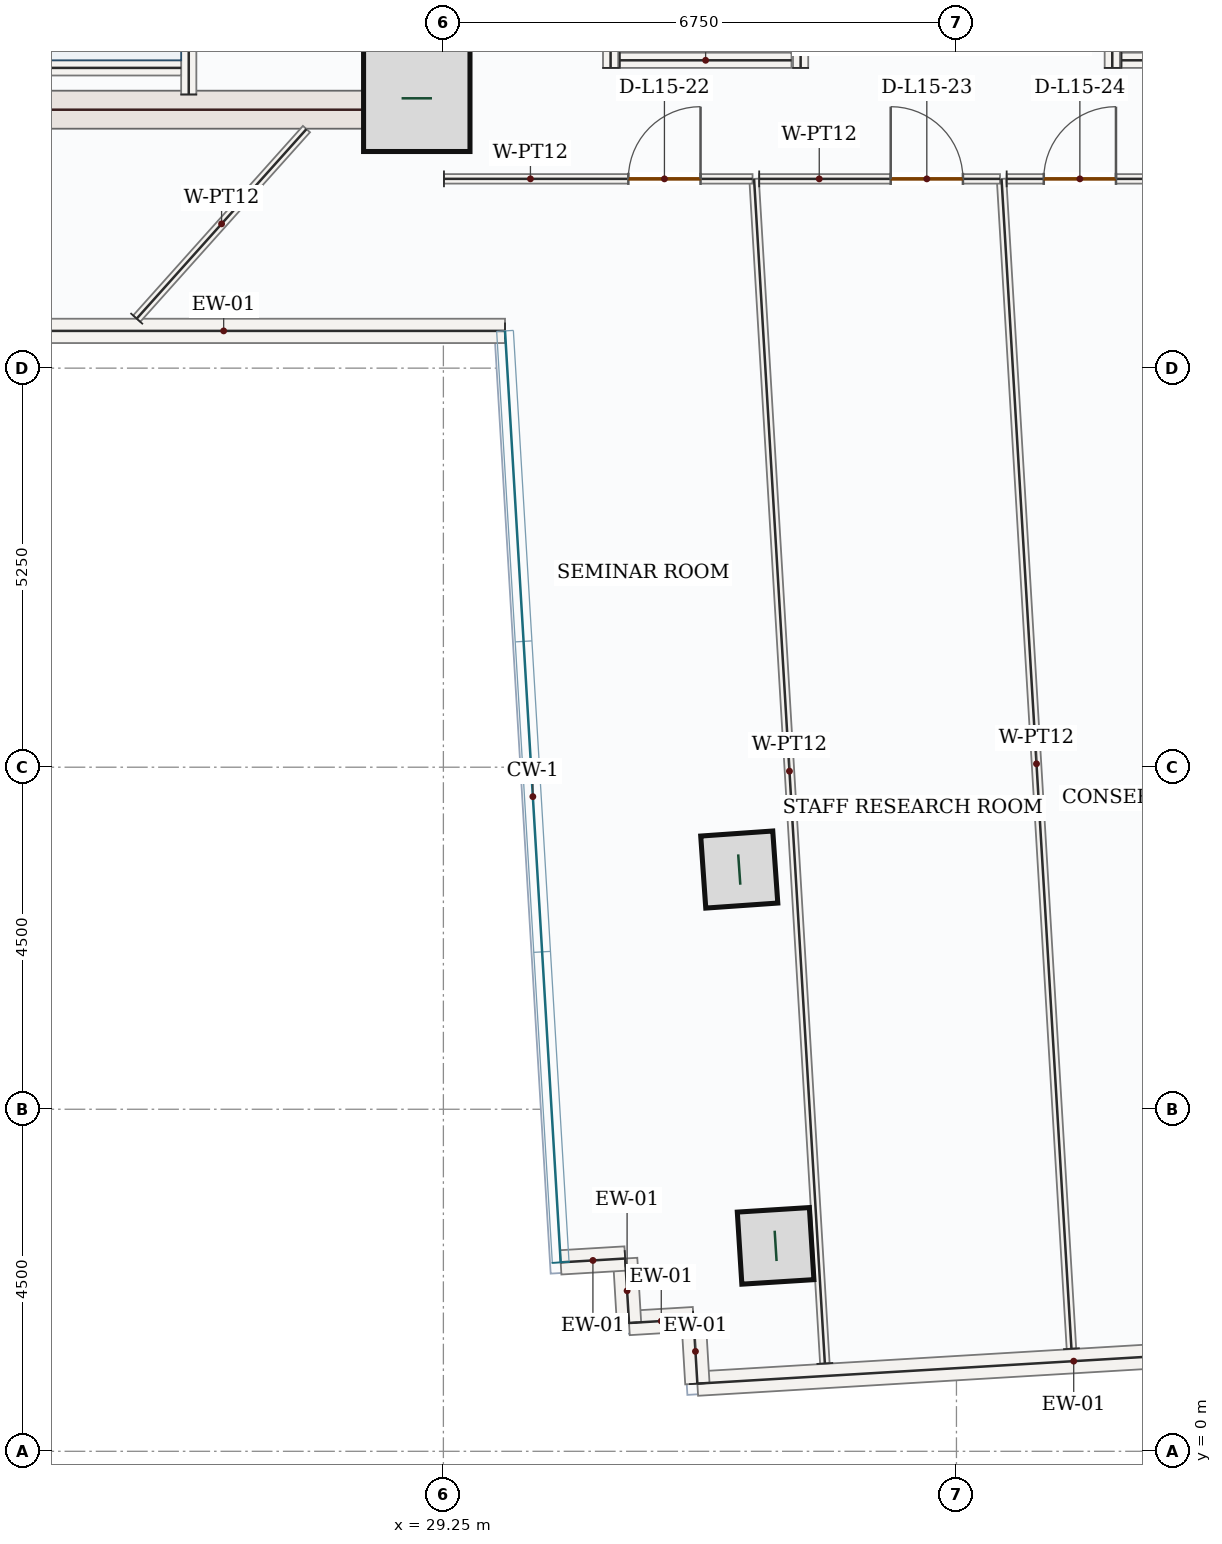
"""IFC4 building model, lengths in metres.
Left out: names, types, materials, properties, quantities, classifications, styles, units other than length and angle.
Written with IfcOpenShell. Run it as: python <this file> out.ifc"""

import sys

from ifc_helpers import new_model, si_unit, direction, frame, frame_2d, origin, origin_2d, place, context, subcontext, project, spatial, rectangle, hollow_rectangle, extrude, source, transform, mapped, element, fill, save


model = new_model("IFC4")
c1 = context("Model", 3, precision=1e-05, world=origin(), true_north=direction((0.0, 1.0)))
c2 = subcontext(c1, "Body", "Model", "MODEL_VIEW")
j1 = project(units=[si_unit("LENGTHUNIT", "METRE"), si_unit("PLANEANGLEUNIT", "RADIAN")], contexts=[c1])
p1 = place(None, origin())
s1 = spatial("IfcSite", under=j1, at=p1, CompositionType="ELEMENT")
p2 = place(p1, origin())
s2 = spatial("IfcBuilding", under=s1, at=p2, CompositionType="ELEMENT")
p3 = place(p2, frame((0.0, 0.0, 71.1)))
s3 = spatial("IfcBuildingStorey", under=s2, at=p3, CompositionType="ELEMENT", Elevation=71.1)
p4 = place(p3, frame((29.0, 17.4, 0.0), z_axis=(0.0, 0.0, 1.0), x_axis=(0.0, 1.0, 0.0)))
e1 = element("IfcWall", 1, at=p4, inside=s3, PredefinedType="SHEAR", context=c2, shape_type="SweptSolid", body=[
    extrude(rectangle(XDim=8.55, YDim=0.5, at=frame_2d((4.275, 0.0))), origin(), (0.0, 0.0, 1.0), 3.95),
])
p5 = place(p4, frame((6.65, 0.0, 0.0)))
e2 = element("IfcOpeningElement", 2, at=p5, cuts=e1, PredefinedType="OPENING", context=c2, shape_type="SweptSolid", body=[
    extrude(rectangle(XDim=1.1, YDim=2.2, at=frame_2d((0.55, 1.1))), frame((0.0, 0.26, 0.0), z_axis=(0.0, -1.0, 0.0), x_axis=(1.0, 0.0, 0.0)), (0.0, 0.0, 1.0), 0.52),
])
p6 = place(p4, frame((3.15, 0.0, 0.0)))
e3 = element("IfcOpeningElement", 3, at=p6, cuts=e1, PredefinedType="OPENING", context=c2, shape_type="SweptSolid", body=[
    extrude(rectangle(XDim=0.88, YDim=2.1, at=frame_2d((0.44, 1.05))), frame((0.0, 0.26, 0.0), z_axis=(0.0, -1.0, 0.0), x_axis=(1.0, 0.0, 0.0)), (0.0, 0.0, 1.0), 0.52),
])
m1 = source(origin(), c2, "Body", "SweptSolid", [
    extrude(rectangle(XDim=7.0, YDim=0.5, at=frame_2d((3.5, 0.0))), origin(), (0.0, 0.0, 1.0), 3.95),
])
p7 = place(p3, frame((21.75, 17.65, 0.0), z_axis=(0.0, 0.0, 1.0), x_axis=(1.0, 0.0, 0.0)))
e4 = element("IfcWall", 4, at=p7, inside=s3, PredefinedType="SHEAR", context=c2, shape_type="MappedRepresentation", body=[
    mapped(m1, transform((0.0, 0.0, 0.0), x_axis=(1.0, 0.0, 0.0), y_axis=(0.0, 1.0, 0.0), z_axis=(0.0, 0.0, 1.0), scale=1.0)),
])
m2 = source(origin(), c2, "Body", "SweptSolid", [
    extrude(rectangle(XDim=1.4, YDim=1.4, at=origin_2d()), origin(), (0.0, 0.0, 1.0), 4.2),
])
p8 = place(p3, frame((28.9, 17.8, 0.0), z_axis=(0.0, 0.0, 1.0), x_axis=(1.0, 0.0, 0.0)))
e5 = element("IfcColumn", 5, at=p8, inside=s3, PredefinedType="COLUMN", context=c2, shape_type="MappedRepresentation", body=[
    mapped(m2, transform((0.0, 0.0, 0.0), x_axis=(1.0, 0.0, 0.0), y_axis=(0.0, 1.0, 0.0), z_axis=(0.0, 0.0, 1.0), scale=1.0)),
])
m3 = source(origin(), c2, "Body", "SweptSolid", [
    extrude(hollow_rectangle(XDim=0.95, YDim=0.95, WallThickness=0.05, at=origin_2d()), origin(), (0.0, 0.0, 1.0), 4.2),
])
for number, where, z_axis, x_axis in (
    (6, (33.143, 7.654, 0.0), (0.0, 0.0, 1.0), (-0.07, 0.998, 0.0)),
    (7, (33.621, 2.703, 0.0), (0.0, 0.0, 1.0), (-0.063, 0.998, 0.0)),
):
    element("IfcColumn", number, at=place(p3, frame(where, z_axis=z_axis, x_axis=x_axis)), inside=s3, PredefinedType="COLUMN", context=c2, shape_type="MappedRepresentation", body=[
        mapped(m3, transform((0.0, 0.0, 0.0), x_axis=(1.0, 0.0, 0.0), y_axis=(0.0, 1.0, 0.0), z_axis=(0.0, 0.0, 1.0), scale=1.0)),
    ])
m4 = source(origin(), c2, "Body", "SweptSolid", [
    extrude(rectangle(XDim=9.92, YDim=0.32, at=frame_2d((4.96, 0.0))), origin(), (0.0, 0.0, 1.0), 3.95),
])
p9 = place(p3, frame((42.494, 1.482, 0.0), z_axis=(0.0, 0.0, 1.0), x_axis=(-0.998218942745, -0.059656871726, 0.0)))
e8 = element("IfcWall", 8, at=p9, inside=s3, PredefinedType="SOLIDWALL", context=c2, shape_type="MappedRepresentation", body=[
    mapped(m4, transform((0.0, 0.0, 0.0), x_axis=(1.0, 0.0, 0.0), y_axis=(0.0, 1.0, 0.0), z_axis=(0.0, 0.0, 1.0), scale=1.0)),
])
m5 = source(origin(), c2, "Body", "SweptSolid", [
    extrude(rectangle(XDim=0.85, YDim=0.32, at=frame_2d((0.425, 0.0))), origin(), (0.0, 0.0, 1.0), 3.95),
])
p10 = place(p3, frame((32.592, 0.89, 0.0), z_axis=(0.0, 0.0, 1.0), x_axis=(-0.059732049764, 0.998214447016, 0.0)))
e9 = element("IfcWall", 9, at=p10, inside=s3, PredefinedType="SOLIDWALL", context=c2, shape_type="MappedRepresentation", body=[
    mapped(m5, transform((0.0, 0.0, 0.0), x_axis=(1.0, 0.0, 0.0), y_axis=(0.0, 1.0, 0.0), z_axis=(0.0, 0.0, 1.0), scale=1.0)),
])
m6 = source(origin(), c2, "Body", "SweptSolid", [
    extrude(rectangle(XDim=0.85, YDim=0.32, at=frame_2d((0.425, 0.0))), origin(), (0.0, 0.0, 1.0), 3.95),
])
for number, where, z_axis, x_axis in (
    (10, (32.541, 1.739, 0.0), (0.0, 0.0, 1.0), (-0.998, -0.06, 0.0)),
    (11, (31.692, 1.688, 0.0), (0.0, 0.0, 1.0), (-0.06, 0.998, 0.0)),
    (12, (31.642, 2.536, 0.0), (0.0, 0.0, 1.0), (-0.998, -0.06, 0.0)),
):
    element("IfcWall", number, at=place(p3, frame(where, z_axis=z_axis, x_axis=x_axis)), inside=s3, PredefinedType="SOLIDWALL", context=c2, shape_type="MappedRepresentation", body=[
        mapped(m6, transform((0.0, 0.0, 0.0), x_axis=(1.0, 0.0, 0.0), y_axis=(0.0, 1.0, 0.0), z_axis=(0.0, 0.0, 1.0), scale=1.0)),
    ])
m7 = source(origin(), c2, "Body", "SweptSolid", [
    extrude(rectangle(XDim=7.403, YDim=0.32, at=frame_2d((3.701, 0.0))), origin(), (0.0, 0.0, 1.0), 3.95),
])
p11 = place(p3, frame((30.061, 14.74, 0.0), z_axis=(0.0, 0.0, 1.0), x_axis=(-1.0, 0.0, 0.0)))
e13 = element("IfcWall", 13, at=p11, inside=s3, PredefinedType="SOLIDWALL", context=c2, shape_type="MappedRepresentation", body=[
    mapped(m7, transform((0.0, 0.0, 0.0), x_axis=(1.0, 0.0, 0.0), y_axis=(0.0, 1.0, 0.0), z_axis=(0.0, 0.0, 1.0), scale=1.0)),
])
p12 = place(p3, frame((25.9, 17.85, 0.0), z_axis=(0.0, 0.0, 1.0), x_axis=(0.0, 1.0, 0.0)))
e14 = element("IfcWall", 14, at=p12, inside=s3, PredefinedType="SOLIDWALL", context=c2, shape_type="SweptSolid", body=[
    extrude(rectangle(XDim=8.0, YDim=0.2, at=frame_2d((4.0, 0.0))), origin(), (0.0, 0.0, 1.0), 3.95),
])
p13 = place(p12, frame((6.3, 0.0, 0.0)))
e15 = element("IfcOpeningElement", 15, at=p13, cuts=e14, PredefinedType="OPENING", context=c2, shape_type="SweptSolid", body=[
    extrude(rectangle(XDim=1.05, YDim=2.15, at=frame_2d((0.525, 1.075))), frame((0.0, 0.11, 0.0), z_axis=(0.0, -1.0, 0.0), x_axis=(1.0, 0.0, 0.0)), (0.0, 0.0, 1.0), 0.22),
])
m8 = source(origin(), c2, "Body", "SweptSolid", [
    extrude(rectangle(XDim=3.25, YDim=0.2, at=frame_2d((1.625, 0.0))), origin(), (0.0, 0.0, 1.0), 3.95),
])
p14 = place(p3, frame((22.55, 18.2, 0.0), z_axis=(0.0, 0.0, 1.0), x_axis=(1.0, 0.0, 0.0)))
e16 = element("IfcWall", 16, at=p14, inside=s3, PredefinedType="SOLIDWALL", context=c2, shape_type="MappedRepresentation", body=[
    mapped(m8, transform((0.0, 0.0, 0.0), x_axis=(1.0, 0.0, 0.0), y_axis=(0.0, 1.0, 0.0), z_axis=(0.0, 0.0, 1.0), scale=1.0)),
])
m9 = source(origin(), c2, "Body", "SweptSolid", [
    extrude(rectangle(XDim=2.35, YDim=0.2, at=frame_2d((1.175, 0.0))), origin(), (0.0, 0.0, 1.0), 3.95),
])
for number, where, z_axis, x_axis in (
    (17, (31.45, 18.2, 0.0), (0.0, 0.0, 1.0), (0.0, 1.0, 0.0)),
    (18, (33.95, 18.2, 0.0), (0.0, 0.0, 1.0), (0.0, 1.0, 0.0)),
):
    element("IfcWall", number, at=place(p3, frame(where, z_axis=z_axis, x_axis=x_axis)), inside=s3, PredefinedType="SOLIDWALL", context=c2, shape_type="MappedRepresentation", body=[
        mapped(m9, transform((0.0, 0.0, 0.0), x_axis=(1.0, 0.0, 0.0), y_axis=(0.0, 1.0, 0.0), z_axis=(0.0, 0.0, 1.0), scale=1.0)),
    ])
m10 = source(origin(), c2, "Body", "SweptSolid", [
    extrude(rectangle(XDim=2.26, YDim=0.2, at=frame_2d((1.13, 0.0))), origin(), (0.0, 0.0, 1.0), 3.95),
])
p15 = place(p3, frame((31.57, 18.3, 0.0), z_axis=(0.0, 0.0, 1.0), x_axis=(1.0, 0.0, 0.0)))
e19 = element("IfcWall", 19, at=p15, inside=s3, PredefinedType="SOLIDWALL", context=c2, shape_type="MappedRepresentation", body=[
    mapped(m10, transform((0.0, 0.0, 0.0), x_axis=(1.0, 0.0, 0.0), y_axis=(0.0, 1.0, 0.0), z_axis=(0.0, 0.0, 1.0), scale=1.0)),
])
p16 = place(p3, frame((38.05, 18.2, 0.0), z_axis=(0.0, 0.0, 1.0), x_axis=(0.0, 1.0, 0.0)))
e20 = element("IfcWall", 20, at=p16, inside=s3, PredefinedType="SOLIDWALL", context=c2, shape_type="MappedRepresentation", body=[
    mapped(m9, transform((0.0, 0.0, 0.0), x_axis=(1.0, 0.0, 0.0), y_axis=(0.0, 1.0, 0.0), z_axis=(0.0, 0.0, 1.0), scale=1.0)),
])
p17 = place(p3, frame((38.17, 18.3, 0.0), z_axis=(0.0, 0.0, 1.0), x_axis=(1.0, 0.0, 0.0)))
e21 = element("IfcWall", 21, at=p17, inside=s3, PredefinedType="SOLIDWALL", context=c2, shape_type="MappedRepresentation", body=[
    mapped(m10, transform((0.0, 0.0, 0.0), x_axis=(1.0, 0.0, 0.0), y_axis=(0.0, 1.0, 0.0), z_axis=(0.0, 0.0, 1.0), scale=1.0)),
])
m11 = source(origin(), c2, "Body", "SweptSolid", [
    extrude(rectangle(XDim=15.418, YDim=0.125, at=frame_2d((7.709, 0.0))), origin(), (0.0, 0.0, 1.0), 3.95),
])
p18 = place(p3, frame((37.513, 1.35, 0.0), z_axis=(0.0, 0.0, 1.0), x_axis=(-0.059666030768, 0.998218395329, 0.0)))
e22 = element("IfcWall", 22, at=p18, inside=s3, PredefinedType="PARTITIONING", context=c2, shape_type="MappedRepresentation", body=[
    mapped(m11, transform((0.0, 0.0, 0.0), x_axis=(1.0, 0.0, 0.0), y_axis=(0.0, 1.0, 0.0), z_axis=(0.0, 0.0, 1.0), scale=1.0)),
])
p19 = place(p3, frame((36.661, 16.74, 0.0), z_axis=(0.0, 0.0, 1.0), x_axis=(1.0, 0.0, 0.0)))
e23 = element("IfcWall", 23, at=p19, inside=s3, PredefinedType="PARTITIONING", context=c2, shape_type="SweptSolid", body=[
    extrude(rectangle(XDim=3.168, YDim=0.125, at=frame_2d((1.584, 0.0))), origin(), (0.0, 0.0, 1.0), 3.95),
])
p20 = place(p19, frame((0.488, 0.0, 0.0)))
e24 = element("IfcOpeningElement", 24, at=p20, cuts=e23, PredefinedType="OPENING", context=c2, shape_type="SweptSolid", body=[
    extrude(rectangle(XDim=0.95, YDim=2.15, at=frame_2d((0.475, 1.075))), frame((0.0, 0.073, 0.0), z_axis=(0.0, -1.0, 0.0), x_axis=(1.0, 0.0, 0.0)), (0.0, 0.0, 1.0), 0.145),
])
m12 = source(origin(), c2, "Body", "SweptSolid", [
    extrude(rectangle(XDim=15.612, YDim=0.125, at=frame_2d((7.806, 0.0))), origin(), (0.0, 0.0, 1.0), 3.95),
])
p21 = place(p3, frame((34.269, 1.156, 0.0), z_axis=(0.0, 0.0, 1.0), x_axis=(-0.059658872533, 0.998218823169, 0.0)))
e25 = element("IfcWall", 25, at=p21, inside=s3, PredefinedType="PARTITIONING", context=c2, shape_type="MappedRepresentation", body=[
    mapped(m12, transform((0.0, 0.0, 0.0), x_axis=(1.0, 0.0, 0.0), y_axis=(0.0, 1.0, 0.0), z_axis=(0.0, 0.0, 1.0), scale=1.0)),
])
p22 = place(p3, frame((33.405, 16.74, 0.0), z_axis=(0.0, 0.0, 1.0), x_axis=(1.0, 0.0, 0.0)))
e26 = element("IfcWall", 26, at=p22, inside=s3, PredefinedType="PARTITIONING", context=c2, shape_type="SweptSolid", body=[
    extrude(rectangle(XDim=3.168, YDim=0.125, at=frame_2d((1.584, 0.0))), origin(), (0.0, 0.0, 1.0), 3.95),
])
p23 = place(p22, frame((1.73, 0.0, 0.0)))
e27 = element("IfcOpeningElement", 27, at=p23, cuts=e26, PredefinedType="OPENING", context=c2, shape_type="SweptSolid", body=[
    extrude(rectangle(XDim=0.95, YDim=2.15, at=frame_2d((0.475, 1.075))), frame((0.0, 0.073, 0.0), z_axis=(0.0, -1.0, 0.0), x_axis=(1.0, 0.0, 0.0)), (0.0, 0.0, 1.0), 0.145),
])
p24 = place(p3, frame((29.258, 16.74, 0.0), z_axis=(0.0, 0.0, 1.0), x_axis=(0.999999998192, -6.0135907e-05, 0.0)))
e28 = element("IfcWall", 28, at=p24, inside=s3, PredefinedType="PARTITIONING", context=c2, shape_type="SweptSolid", body=[
    extrude(rectangle(XDim=4.06, YDim=0.125, at=frame_2d((2.03, 0.0))), origin(), (0.0, 0.0, 1.0), 3.95),
])
p25 = place(p24, frame((2.426, 0.0, 0.0)))
e29 = element("IfcOpeningElement", 29, at=p25, cuts=e28, PredefinedType="OPENING", context=c2, shape_type="SweptSolid", body=[
    extrude(rectangle(XDim=0.95, YDim=2.15, at=frame_2d((0.475, 1.075))), frame((0.0, 0.073, 0.0), z_axis=(0.0, -1.0, 0.0), x_axis=(1.0, 0.0, 0.0)), (0.0, 0.0, 1.0), 0.145),
])
m13 = source(origin(), c2, "Body", "SweptSolid", [
    extrude(rectangle(XDim=3.348, YDim=0.125, at=frame_2d((1.674, 0.0))), origin(), (0.0, 0.0, 1.0), 3.95),
])
p26 = place(p3, frame((25.215, 14.901, 0.0), z_axis=(0.0, 0.0, 1.0), x_axis=(0.667206176518, 0.74487308853, 0.0)))
e30 = element("IfcWall", 30, at=p26, inside=s3, PredefinedType="PARTITIONING", context=c2, shape_type="MappedRepresentation", body=[
    mapped(m13, transform((0.0, 0.0, 0.0), x_axis=(1.0, 0.0, 0.0), y_axis=(0.0, 1.0, 0.0), z_axis=(0.0, 0.0, 1.0), scale=1.0)),
])
m14 = source(origin(), c2, "Body", "SweptSolid", [
    extrude(rectangle(XDim=0.95, YDim=2.15, at=frame_2d((0.475, 1.075))), frame((0.0, 0.025, 0.0), z_axis=(0.0, -1.0, 0.0), x_axis=(1.0, 0.0, 0.0)), (0.0, 0.0, 1.0), 0.05),
])
p27 = place(p25, origin())
e31 = element("IfcDoor", 31, at=p27, inside=s3, OperationType="SINGLE_SWING_RIGHT", PredefinedType="DOOR", context=c2, shape_type="MappedRepresentation", body=[
    mapped(m14, transform((0.0, 0.0, 0.0), x_axis=(1.0, 0.0, 0.0), y_axis=(0.0, 1.0, 0.0), z_axis=(0.0, 0.0, 1.0), scale=1.0)),
])
fill(e29, e31)
p28 = place(p23, origin())
e32 = element("IfcDoor", 32, at=p28, inside=s3, OperationType="SINGLE_SWING_LEFT", PredefinedType="DOOR", context=c2, shape_type="MappedRepresentation", body=[
    mapped(m14, transform((0.0, 0.0, 0.0), x_axis=(1.0, 0.0, 0.0), y_axis=(0.0, 1.0, 0.0), z_axis=(0.0, 0.0, 1.0), scale=1.0)),
])
fill(e27, e32)
p29 = place(p20, origin())
e33 = element("IfcDoor", 33, at=p29, inside=s3, OperationType="SINGLE_SWING_RIGHT", PredefinedType="DOOR", context=c2, shape_type="MappedRepresentation", body=[
    mapped(m14, transform((0.0, 0.0, 0.0), x_axis=(1.0, 0.0, 0.0), y_axis=(0.0, 1.0, 0.0), z_axis=(0.0, 0.0, 1.0), scale=1.0)),
])
fill(e24, e33)
save(model, sys.argv[1])
